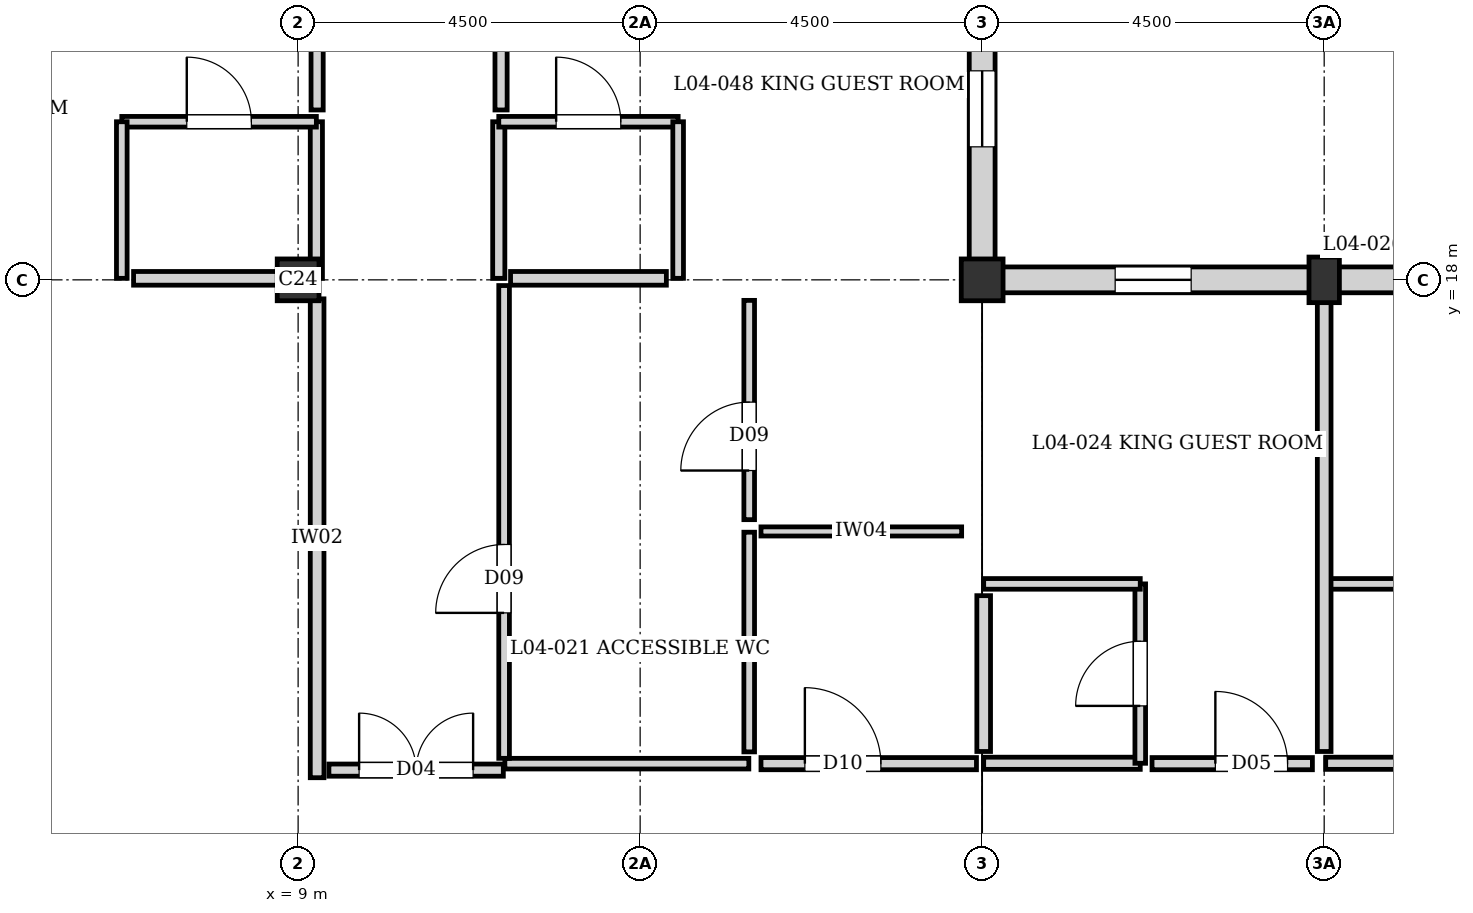
"""IFC4 building model, lengths in metres.
Left out: names, types, materials, properties, quantities, classifications, styles, units other than length and angle.
Written with IfcOpenShell. Run it as: python <this file> out.ifc"""

import sys

from ifc_helpers import new_model, si_unit, direction, frame, frame_2d, origin, origin_2d, place, context, subcontext, project, spatial, rectangle, extrude, element, fill, save


model = new_model("IFC4")
c1 = context("Model", 3, precision=1e-05, world=origin(), true_north=direction((0.0, 1.0)))
c2 = subcontext(c1, "Body", "Model", "MODEL_VIEW")
j1 = project(units=[si_unit("LENGTHUNIT", "METRE"), si_unit("PLANEANGLEUNIT", "RADIAN")], contexts=[c1])
p1 = place(None, origin())
s1 = spatial("IfcSite", under=j1, at=p1, CompositionType="ELEMENT")
p2 = place(p1, origin())
s2 = spatial("IfcBuilding", under=s1, at=p2, CompositionType="ELEMENT")
p3 = place(p2, frame((0.0, 0.0, 14.56)))
s3 = spatial("IfcBuildingStorey", under=s2, at=p3, CompositionType="ELEMENT", Elevation=14.56)
for number, where, z_axis, x_axis in (
    (1, (9.0, 18.0, 0.0), (0.0, 0.0, 1.0), (1.0, 0.0, 0.0)),
    (2, (18.0, 18.0, 0.0), (0.0, 0.0, 1.0), (1.0, 0.0, 0.0)),
):
    element("IfcColumn", number, at=place(p3, frame(where, z_axis=z_axis, x_axis=x_axis)), inside=s3, PredefinedType="COLUMN", context=c2, shape_type="SweptSolid", body=[
        extrude(rectangle(XDim=0.55, YDim=0.55, at=origin_2d()), origin(), (0.0, 0.0, 1.0), 3.04),
    ])
p4 = place(p3, frame((22.5, 18.0, 0.0), z_axis=(0.0, 0.0, 1.0), x_axis=(1.0, 0.0, 0.0)))
e3 = element("IfcColumn", 3, at=p4, inside=s3, PredefinedType="PILASTER", context=c2, shape_type="SweptSolid", body=[
    extrude(rectangle(XDim=0.4, YDim=0.6, at=origin_2d()), origin(), (0.0, 0.0, 1.0), 3.04),
])
p5 = place(p3, frame((18.0, 27.0, 0.0), z_axis=(0.0, 0.0, 1.0), x_axis=(0.0, -1.0, 0.0)))
e4 = element("IfcWall", 4, at=p5, inside=s3, PredefinedType="SOLIDWALL", context=c2, shape_type="SweptSolid", body=[
    extrude(rectangle(XDim=8.845, YDim=0.34, at=frame_2d((4.422, 0.0))), origin(), (0.0, 0.0, 1.0), 2.48),
])
p6 = place(p5, frame((1.75, 0.0, 0.35)))
e5 = element("IfcOpeningElement", 5, at=p6, cuts=e4, PredefinedType="OPENING", context=c2, shape_type="SweptSolid", body=[
    extrude(rectangle(XDim=1.0, YDim=1.6, at=frame_2d((0.5, 0.8))), frame((0.0, 0.18, 0.0), z_axis=(0.0, -1.0, 0.0), x_axis=(1.0, 0.0, 0.0)), (0.0, 0.0, 1.0), 0.36),
])
p7 = place(p5, frame((6.25, 0.0, 0.35)))
e6 = element("IfcOpeningElement", 6, at=p7, cuts=e4, PredefinedType="OPENING", context=c2, shape_type="SweptSolid", body=[
    extrude(rectangle(XDim=1.0, YDim=1.6, at=frame_2d((0.5, 0.8))), frame((0.0, 0.18, 0.0), z_axis=(0.0, -1.0, 0.0), x_axis=(1.0, 0.0, 0.0)), (0.0, 0.0, 1.0), 0.36),
])
p8 = place(p3, frame((18.0, 18.0, 0.0), z_axis=(0.0, 0.0, 1.0), x_axis=(1.0, 0.0, 0.0)))
e7 = element("IfcWall", 7, at=p8, inside=s3, PredefinedType="SOLIDWALL", context=c2, shape_type="SweptSolid", body=[
    extrude(rectangle(XDim=9.0, YDim=0.34, at=frame_2d((4.5, 0.0))), origin(), (0.0, 0.0, 1.0), 2.55),
])
p9 = place(p8, frame((1.75, 0.0, 0.35)))
e8 = element("IfcOpeningElement", 8, at=p9, cuts=e7, PredefinedType="OPENING", context=c2, shape_type="SweptSolid", body=[
    extrude(rectangle(XDim=1.0, YDim=1.6, at=frame_2d((0.5, 0.8))), frame((0.0, 0.18, 0.0), z_axis=(0.0, -1.0, 0.0), x_axis=(1.0, 0.0, 0.0)), (0.0, 0.0, 1.0), 0.36),
])
p10 = place(p8, frame((6.25, 0.0, 0.35)))
e9 = element("IfcOpeningElement", 9, at=p10, cuts=e7, PredefinedType="OPENING", context=c2, shape_type="SweptSolid", body=[
    extrude(rectangle(XDim=1.0, YDim=1.6, at=frame_2d((0.5, 0.8))), frame((0.0, 0.18, 0.0), z_axis=(0.0, -1.0, 0.0), x_axis=(1.0, 0.0, 0.0)), (0.0, 0.0, 1.0), 0.36),
])
p11 = place(p3, frame((18.02, 11.64, 0.0), z_axis=(0.0, 0.0, 1.0), x_axis=(1.0, 0.0, 0.0)))
e10 = element("IfcWall", 10, at=p11, inside=s3, PredefinedType="PARTITIONING", context=c2, shape_type="SweptSolid", body=[
    extrude(rectangle(XDim=2.06, YDim=0.16, at=frame_2d((1.03, 0.0))), origin(), (0.0, 0.0, 1.0), 2.82),
])
p12 = place(p3, frame((20.08, 11.64, 0.0), z_axis=(0.0, 0.0, 1.0), x_axis=(0.0, 1.0, 0.0)))
e11 = element("IfcWall", 11, at=p12, inside=s3, PredefinedType="PLUMBINGWALL", context=c2, shape_type="SweptSolid", body=[
    extrude(rectangle(XDim=2.36, YDim=0.14, at=frame_2d((1.18, 0.0))), origin(), (0.0, 0.0, 1.0), 2.82),
])
p13 = place(p12, frame((0.755, 0.0, 0.0)))
e12 = element("IfcOpeningElement", 12, at=p13, cuts=e11, PredefinedType="OPENING", context=c2, shape_type="SweptSolid", body=[
    extrude(rectangle(XDim=0.85, YDim=2.04, at=frame_2d((0.425, 1.02))), frame((0.0, 0.08, 0.0), z_axis=(0.0, -1.0, 0.0), x_axis=(1.0, 0.0, 0.0)), (0.0, 0.0, 1.0), 0.16),
])
p14 = place(p3, frame((18.02, 14.0, 0.0), z_axis=(0.0, 0.0, 1.0), x_axis=(1.0, 0.0, 0.0)))
e13 = element("IfcWall", 13, at=p14, inside=s3, PredefinedType="PLUMBINGWALL", context=c2, shape_type="SweptSolid", body=[
    extrude(rectangle(XDim=2.06, YDim=0.14, at=frame_2d((1.03, 0.0))), origin(), (0.0, 0.0, 1.0), 2.82),
])
p15 = place(p3, frame((22.52, 11.64, 0.0), z_axis=(0.0, 0.0, 1.0), x_axis=(1.0, 0.0, 0.0)))
e14 = element("IfcWall", 14, at=p15, inside=s3, PredefinedType="PARTITIONING", context=c2, shape_type="SweptSolid", body=[
    extrude(rectangle(XDim=2.06, YDim=0.16, at=frame_2d((1.03, 0.0))), origin(), (0.0, 0.0, 1.0), 2.82),
])
p16 = place(p3, frame((22.52, 14.0, 0.0), z_axis=(0.0, 0.0, 1.0), x_axis=(1.0, 0.0, 0.0)))
e15 = element("IfcWall", 15, at=p16, inside=s3, PredefinedType="PLUMBINGWALL", context=c2, shape_type="SweptSolid", body=[
    extrude(rectangle(XDim=2.06, YDim=0.14, at=frame_2d((1.03, 0.0))), origin(), (0.0, 0.0, 1.0), 2.82),
])
p17 = place(p3, frame((9.24, 18.02, 0.0), z_axis=(0.0, 0.0, 1.0), x_axis=(0.0, 1.0, 0.0)))
e16 = element("IfcWall", 16, at=p17, inside=s3, PredefinedType="PARTITIONING", context=c2, shape_type="SweptSolid", body=[
    extrude(rectangle(XDim=2.06, YDim=0.16, at=frame_2d((1.03, 0.0))), origin(), (0.0, 0.0, 1.0), 2.82),
])
p18 = place(p3, frame((6.68, 20.08, 0.0), z_axis=(0.0, 0.0, 1.0), x_axis=(1.0, 0.0, 0.0)))
e17 = element("IfcWall", 17, at=p18, inside=s3, PredefinedType="PLUMBINGWALL", context=c2, shape_type="SweptSolid", body=[
    extrude(rectangle(XDim=2.56, YDim=0.14, at=frame_2d((1.28, 0.0))), origin(), (0.0, 0.0, 1.0), 2.82),
])
p19 = place(p18, frame((0.855, 0.0, 0.0)))
e18 = element("IfcOpeningElement", 18, at=p19, cuts=e17, PredefinedType="OPENING", context=c2, shape_type="SweptSolid", body=[
    extrude(rectangle(XDim=0.85, YDim=2.04, at=frame_2d((0.425, 1.02))), frame((0.0, 0.08, 0.0), z_axis=(0.0, -1.0, 0.0), x_axis=(1.0, 0.0, 0.0)), (0.0, 0.0, 1.0), 0.16),
])
p20 = place(p3, frame((6.68, 18.02, 0.0), z_axis=(0.0, 0.0, 1.0), x_axis=(0.0, 1.0, 0.0)))
e19 = element("IfcWall", 19, at=p20, inside=s3, PredefinedType="PLUMBINGWALL", context=c2, shape_type="SweptSolid", body=[
    extrude(rectangle(XDim=2.06, YDim=0.14, at=frame_2d((1.03, 0.0))), origin(), (0.0, 0.0, 1.0), 2.82),
])
p21 = place(p3, frame((11.64, 18.02, 0.0), z_axis=(0.0, 0.0, 1.0), x_axis=(0.0, 1.0, 0.0)))
e20 = element("IfcWall", 20, at=p21, inside=s3, PredefinedType="PARTITIONING", context=c2, shape_type="SweptSolid", body=[
    extrude(rectangle(XDim=2.06, YDim=0.16, at=frame_2d((1.03, 0.0))), origin(), (0.0, 0.0, 1.0), 2.82),
])
p22 = place(p3, frame((11.64, 20.08, 0.0), z_axis=(0.0, 0.0, 1.0), x_axis=(1.0, 0.0, 0.0)))
e21 = element("IfcWall", 21, at=p22, inside=s3, PredefinedType="PLUMBINGWALL", context=c2, shape_type="SweptSolid", body=[
    extrude(rectangle(XDim=2.36, YDim=0.14, at=frame_2d((1.18, 0.0))), origin(), (0.0, 0.0, 1.0), 2.82),
])
p23 = place(p22, frame((0.755, 0.0, 0.0)))
e22 = element("IfcOpeningElement", 22, at=p23, cuts=e21, PredefinedType="OPENING", context=c2, shape_type="SweptSolid", body=[
    extrude(rectangle(XDim=0.85, YDim=2.04, at=frame_2d((0.425, 1.02))), frame((0.0, 0.08, 0.0), z_axis=(0.0, -1.0, 0.0), x_axis=(1.0, 0.0, 0.0)), (0.0, 0.0, 1.0), 0.16),
])
p24 = place(p3, frame((14.0, 18.02, 0.0), z_axis=(0.0, 0.0, 1.0), x_axis=(0.0, 1.0, 0.0)))
e23 = element("IfcWall", 23, at=p24, inside=s3, PredefinedType="PLUMBINGWALL", context=c2, shape_type="SweptSolid", body=[
    extrude(rectangle(XDim=2.06, YDim=0.14, at=frame_2d((1.03, 0.0))), origin(), (0.0, 0.0, 1.0), 2.82),
])
p25 = place(p3, frame((9.25, 11.45, 0.0), z_axis=(0.0, 0.0, 1.0), x_axis=(0.0, 1.0, 0.0)))
e24 = element("IfcWall", 24, at=p25, inside=s3, PredefinedType="PARTITIONING", context=c2, shape_type="SweptSolid", body=[
    extrude(rectangle(XDim=6.3, YDim=0.18, at=frame_2d((3.15, 0.0))), origin(), (0.0, 0.0, 1.0), 2.82),
])
p26 = place(p3, frame((22.5, 11.795, 0.0), z_axis=(0.0, 0.0, 1.0), x_axis=(0.0, 1.0, 0.0)))
e25 = element("IfcWall", 25, at=p26, inside=s3, PredefinedType="PARTITIONING", context=c2, shape_type="SweptSolid", body=[
    extrude(rectangle(XDim=6.03, YDim=0.18, at=frame_2d((3.015, 0.0))), origin(), (0.0, 0.0, 1.0), 2.82),
])
p27 = place(p3, frame((18.02, 11.795, 0.0), z_axis=(0.0, 0.0, 1.0), x_axis=(0.0, 1.0, 0.0)))
e26 = element("IfcWall", 26, at=p27, inside=s3, PredefinedType="PARTITIONING", context=c2, shape_type="SweptSolid", body=[
    extrude(rectangle(XDim=2.05, YDim=0.18, at=frame_2d((1.025, 0.0))), origin(), (0.0, 0.0, 1.0), 2.82),
])
p28 = place(p3, frame((6.835, 18.02, 0.0), z_axis=(0.0, 0.0, 1.0), x_axis=(1.0, 0.0, 0.0)))
e27 = element("IfcWall", 27, at=p28, inside=s3, PredefinedType="PARTITIONING", context=c2, shape_type="SweptSolid", body=[
    extrude(rectangle(XDim=2.26, YDim=0.18, at=frame_2d((1.13, 0.0))), origin(), (0.0, 0.0, 1.0), 2.42),
])
p29 = place(p3, frame((11.795, 18.02, 0.0), z_axis=(0.0, 0.0, 1.0), x_axis=(1.0, 0.0, 0.0)))
e28 = element("IfcWall", 28, at=p29, inside=s3, PredefinedType="PARTITIONING", context=c2, shape_type="SweptSolid", body=[
    extrude(rectangle(XDim=2.05, YDim=0.18, at=frame_2d((1.025, 0.0))), origin(), (0.0, 0.0, 1.0), 2.38),
])
p30 = place(p3, frame((11.72, 11.635, 0.0), z_axis=(0.0, 0.0, 1.0), x_axis=(1.0, 0.0, 0.0)))
e29 = element("IfcWall", 29, at=p30, inside=s3, PredefinedType="PLUMBINGWALL", context=c2, shape_type="SweptSolid", body=[
    extrude(rectangle(XDim=3.21, YDim=0.14, at=frame_2d((1.605, 0.0))), origin(), (0.0, 0.0, 1.0), 2.82),
])
p31 = place(p3, frame((14.935, 11.79, 0.0), z_axis=(0.0, 0.0, 1.0), x_axis=(0.0, 1.0, 0.0)))
e30 = element("IfcWall", 30, at=p31, inside=s3, PredefinedType="PLUMBINGWALL", context=c2, shape_type="SweptSolid", body=[
    extrude(rectangle(XDim=2.89, YDim=0.14, at=frame_2d((1.445, 0.0))), origin(), (0.0, 0.0, 1.0), 2.82),
])
p32 = place(p3, frame((15.09, 14.69, 0.0), z_axis=(0.0, 0.0, 1.0), x_axis=(1.0, 0.0, 0.0)))
e31 = element("IfcWall", 31, at=p32, inside=s3, PredefinedType="PARTITIONING", context=c2, shape_type="SweptSolid", body=[
    extrude(rectangle(XDim=2.64, YDim=0.12, at=frame_2d((1.32, 0.0))), origin(), (0.0, 0.0, 1.0), 2.82),
])
p33 = place(p3, frame((9.405, 11.55, 0.0), z_axis=(0.0, 0.0, 1.0), x_axis=(1.0, 0.0, 0.0)))
e32 = element("IfcWall", 32, at=p33, inside=s3, PredefinedType="PARTITIONING", context=c2, shape_type="SweptSolid", body=[
    extrude(rectangle(XDim=2.295, YDim=0.16, at=frame_2d((1.147, 0.0))), origin(), (0.0, 0.0, 1.0), 2.82),
])
p34 = place(p33, frame((0.397, 0.0, 0.0)))
e33 = element("IfcOpeningElement", 33, at=p34, cuts=e32, PredefinedType="OPENING", context=c2, shape_type="SweptSolid", body=[
    extrude(rectangle(XDim=1.5, YDim=2.1, at=frame_2d((0.75, 1.05))), frame((0.0, 0.09, 0.0), z_axis=(0.0, -1.0, 0.0), x_axis=(1.0, 0.0, 0.0)), (0.0, 0.0, 1.0), 0.18),
])
p35 = place(p3, frame((15.09, 11.635, 0.0), z_axis=(0.0, 0.0, 1.0), x_axis=(1.0, 0.0, 0.0)))
e34 = element("IfcWall", 34, at=p35, inside=s3, PredefinedType="PARTITIONING", context=c2, shape_type="SweptSolid", body=[
    extrude(rectangle(XDim=2.835, YDim=0.16, at=frame_2d((1.417, 0.0))), origin(), (0.0, 0.0, 1.0), 2.82),
])
p36 = place(p35, frame((0.577, 0.0, 0.0)))
e35 = element("IfcOpeningElement", 35, at=p36, cuts=e34, PredefinedType="OPENING", context=c2, shape_type="SweptSolid", body=[
    extrude(rectangle(XDim=1.0, YDim=2.1, at=frame_2d((0.5, 1.05))), frame((0.0, 0.09, 0.0), z_axis=(0.0, -1.0, 0.0), x_axis=(1.0, 0.0, 0.0)), (0.0, 0.0, 1.0), 0.18),
])
p37 = place(p3, frame((20.235, 11.635, 0.0), z_axis=(0.0, 0.0, 1.0), x_axis=(1.0, 0.0, 0.0)))
e36 = element("IfcWall", 36, at=p37, inside=s3, PredefinedType="PARTITIONING", context=c2, shape_type="SweptSolid", body=[
    extrude(rectangle(XDim=2.11, YDim=0.16, at=frame_2d((1.055, 0.0))), origin(), (0.0, 0.0, 1.0), 2.82),
])
p38 = place(p37, frame((0.833, 0.0, 0.0)))
e37 = element("IfcOpeningElement", 37, at=p38, cuts=e36, PredefinedType="OPENING", context=c2, shape_type="SweptSolid", body=[
    extrude(rectangle(XDim=0.95, YDim=2.15, at=frame_2d((0.475, 1.075))), frame((0.0, 0.09, 0.0), z_axis=(0.0, -1.0, 0.0), x_axis=(1.0, 0.0, 0.0)), (0.0, 0.0, 1.0), 0.18),
])
p39 = place(p3, frame((11.71, 11.705, 0.0), z_axis=(0.0, 0.0, 1.0), x_axis=(0.0, 1.0, 0.0)))
e38 = element("IfcWall", 38, at=p39, inside=s3, PredefinedType="PLUMBINGWALL", context=c2, shape_type="SweptSolid", body=[
    extrude(rectangle(XDim=6.22, YDim=0.14, at=frame_2d((3.11, 0.0))), origin(), (0.0, 0.0, 1.0), 2.82),
])
p40 = place(p39, frame((1.914, 0.0, 0.0)))
e39 = element("IfcOpeningElement", 39, at=p40, cuts=e38, PredefinedType="OPENING", context=c2, shape_type="SweptSolid", body=[
    extrude(rectangle(XDim=0.9, YDim=2.1, at=frame_2d((0.45, 1.05))), frame((0.0, 0.08, 0.0), z_axis=(0.0, -1.0, 0.0), x_axis=(1.0, 0.0, 0.0)), (0.0, 0.0, 1.0), 0.16),
])
p41 = place(p3, frame((9.25, 20.235, 0.0), z_axis=(0.0, 0.0, 1.0), x_axis=(0.0, 1.0, 0.0)))
e40 = element("IfcWall", 40, at=p41, inside=s3, PredefinedType="PARTITIONING", context=c2, shape_type="SweptSolid", body=[
    extrude(rectangle(XDim=2.11, YDim=0.16, at=frame_2d((1.055, 0.0))), origin(), (0.0, 0.0, 1.0), 2.82),
])
p42 = place(p41, frame((0.833, 0.0, 0.0)))
e41 = element("IfcOpeningElement", 41, at=p42, cuts=e40, PredefinedType="OPENING", context=c2, shape_type="SweptSolid", body=[
    extrude(rectangle(XDim=0.95, YDim=2.15, at=frame_2d((0.475, 1.075))), frame((0.0, 0.09, 0.0), z_axis=(0.0, -1.0, 0.0), x_axis=(1.0, 0.0, 0.0)), (0.0, 0.0, 1.0), 0.18),
])
p43 = place(p3, frame((11.67, 20.235, 0.0), z_axis=(0.0, 0.0, 1.0), x_axis=(0.0, 1.0, 0.0)))
e42 = element("IfcWall", 42, at=p43, inside=s3, PredefinedType="PARTITIONING", context=c2, shape_type="SweptSolid", body=[
    extrude(rectangle(XDim=2.11, YDim=0.16, at=frame_2d((1.055, 0.0))), origin(), (0.0, 0.0, 1.0), 2.82),
])
p44 = place(p43, frame((0.833, 0.0, 0.0)))
e43 = element("IfcOpeningElement", 43, at=p44, cuts=e42, PredefinedType="OPENING", context=c2, shape_type="SweptSolid", body=[
    extrude(rectangle(XDim=0.95, YDim=2.15, at=frame_2d((0.475, 1.075))), frame((0.0, 0.09, 0.0), z_axis=(0.0, -1.0, 0.0), x_axis=(1.0, 0.0, 0.0)), (0.0, 0.0, 1.0), 0.18),
])
p45 = place(p3, frame((14.935, 14.845, 0.0), z_axis=(0.0, 0.0, 1.0), x_axis=(0.0, 1.0, 0.0)))
e44 = element("IfcWall", 44, at=p45, inside=s3, PredefinedType="PLUMBINGWALL", context=c2, shape_type="SweptSolid", body=[
    extrude(rectangle(XDim=2.885, YDim=0.14, at=frame_2d((1.442, 0.0))), origin(), (0.0, 0.0, 1.0), 2.82),
])
p46 = place(p45, frame((0.646, 0.0, 0.0)))
e45 = element("IfcOpeningElement", 45, at=p46, cuts=e44, PredefinedType="OPENING", context=c2, shape_type="SweptSolid", body=[
    extrude(rectangle(XDim=0.9, YDim=2.1, at=frame_2d((0.45, 1.05))), frame((0.0, 0.08, 0.0), z_axis=(0.0, -1.0, 0.0), x_axis=(1.0, 0.0, 0.0)), (0.0, 0.0, 1.0), 0.16),
])
p47 = place(p7, origin())
e46 = element("IfcWindow", 46, at=p47, inside=s3, PartitioningType="SINGLE_PANEL", PredefinedType="WINDOW", context=c2, shape_type="SweptSolid", body=[
    extrude(rectangle(XDim=1.0, YDim=1.6, at=frame_2d((0.5, 0.8))), frame((0.0, 0.03, 0.0), z_axis=(0.0, -1.0, 0.0), x_axis=(1.0, 0.0, 0.0)), (0.0, 0.0, 1.0), 0.06),
])
fill(e6, e46)
p48 = place(p9, origin())
e47 = element("IfcWindow", 47, at=p48, inside=s3, PartitioningType="SINGLE_PANEL", PredefinedType="WINDOW", context=c2, shape_type="SweptSolid", body=[
    extrude(rectangle(XDim=1.0, YDim=1.6, at=frame_2d((0.5, 0.8))), frame((0.0, 0.03, 0.0), z_axis=(0.0, -1.0, 0.0), x_axis=(1.0, 0.0, 0.0)), (0.0, 0.0, 1.0), 0.06),
])
fill(e8, e47)
p49 = place(p13, origin())
e48 = element("IfcDoor", 48, at=p49, inside=s3, OperationType="SINGLE_SWING_LEFT", PredefinedType="DOOR", context=c2, shape_type="SweptSolid", body=[
    extrude(rectangle(XDim=0.85, YDim=2.04, at=frame_2d((0.425, 1.02))), frame((0.0, 0.025, 0.0), z_axis=(0.0, -1.0, 0.0), x_axis=(1.0, 0.0, 0.0)), (0.0, 0.0, 1.0), 0.05),
])
fill(e12, e48)
p50 = place(p19, origin())
e49 = element("IfcDoor", 49, at=p50, inside=s3, OperationType="SINGLE_SWING_LEFT", PredefinedType="DOOR", context=c2, shape_type="SweptSolid", body=[
    extrude(rectangle(XDim=0.85, YDim=2.04, at=frame_2d((0.425, 1.02))), frame((0.0, 0.025, 0.0), z_axis=(0.0, -1.0, 0.0), x_axis=(1.0, 0.0, 0.0)), (0.0, 0.0, 1.0), 0.05),
])
fill(e18, e49)
p51 = place(p23, origin())
e50 = element("IfcDoor", 50, at=p51, inside=s3, OperationType="SINGLE_SWING_LEFT", PredefinedType="DOOR", context=c2, shape_type="SweptSolid", body=[
    extrude(rectangle(XDim=0.85, YDim=2.04, at=frame_2d((0.425, 1.02))), frame((0.0, 0.025, 0.0), z_axis=(0.0, -1.0, 0.0), x_axis=(1.0, 0.0, 0.0)), (0.0, 0.0, 1.0), 0.05),
])
fill(e22, e50)
p52 = place(p34, origin())
e51 = element("IfcDoor", 51, at=p52, inside=s3, OperationType="DOUBLE_DOOR_SINGLE_SWING", PredefinedType="DOOR", context=c2, shape_type="SweptSolid", body=[
    extrude(rectangle(XDim=1.5, YDim=2.1, at=frame_2d((0.75, 1.05))), frame((0.0, 0.025, 0.0), z_axis=(0.0, -1.0, 0.0), x_axis=(1.0, 0.0, 0.0)), (0.0, 0.0, 1.0), 0.05),
])
fill(e33, e51)
p53 = place(p36, origin())
e52 = element("IfcDoor", 52, at=p53, inside=s3, OperationType="SINGLE_SWING_LEFT", PredefinedType="DOOR", context=c2, shape_type="SweptSolid", body=[
    extrude(rectangle(XDim=1.0, YDim=2.1, at=frame_2d((0.5, 1.05))), frame((0.0, 0.025, 0.0), z_axis=(0.0, -1.0, 0.0), x_axis=(1.0, 0.0, 0.0)), (0.0, 0.0, 1.0), 0.05),
])
fill(e35, e52)
p54 = place(p38, origin())
e53 = element("IfcDoor", 53, at=p54, inside=s3, OperationType="SINGLE_SWING_LEFT", PredefinedType="DOOR", context=c2, shape_type="SweptSolid", body=[
    extrude(rectangle(XDim=0.95, YDim=2.15, at=frame_2d((0.475, 1.075))), frame((0.0, 0.025, 0.0), z_axis=(0.0, -1.0, 0.0), x_axis=(1.0, 0.0, 0.0)), (0.0, 0.0, 1.0), 0.05),
])
fill(e37, e53)
p55 = place(p40, origin())
e54 = element("IfcDoor", 54, at=p55, inside=s3, OperationType="SINGLE_SWING_LEFT", PredefinedType="DOOR", context=c2, shape_type="SweptSolid", body=[
    extrude(rectangle(XDim=0.9, YDim=2.1, at=frame_2d((0.45, 1.05))), frame((0.0, 0.025, 0.0), z_axis=(0.0, -1.0, 0.0), x_axis=(1.0, 0.0, 0.0)), (0.0, 0.0, 1.0), 0.05),
])
fill(e39, e54)
p56 = place(p46, origin())
e55 = element("IfcDoor", 55, at=p56, inside=s3, OperationType="SINGLE_SWING_LEFT", PredefinedType="DOOR", context=c2, shape_type="SweptSolid", body=[
    extrude(rectangle(XDim=0.9, YDim=2.1, at=frame_2d((0.45, 1.05))), frame((0.0, 0.025, 0.0), z_axis=(0.0, -1.0, 0.0), x_axis=(1.0, 0.0, 0.0)), (0.0, 0.0, 1.0), 0.05),
])
fill(e45, e55)
save(model, sys.argv[1])
